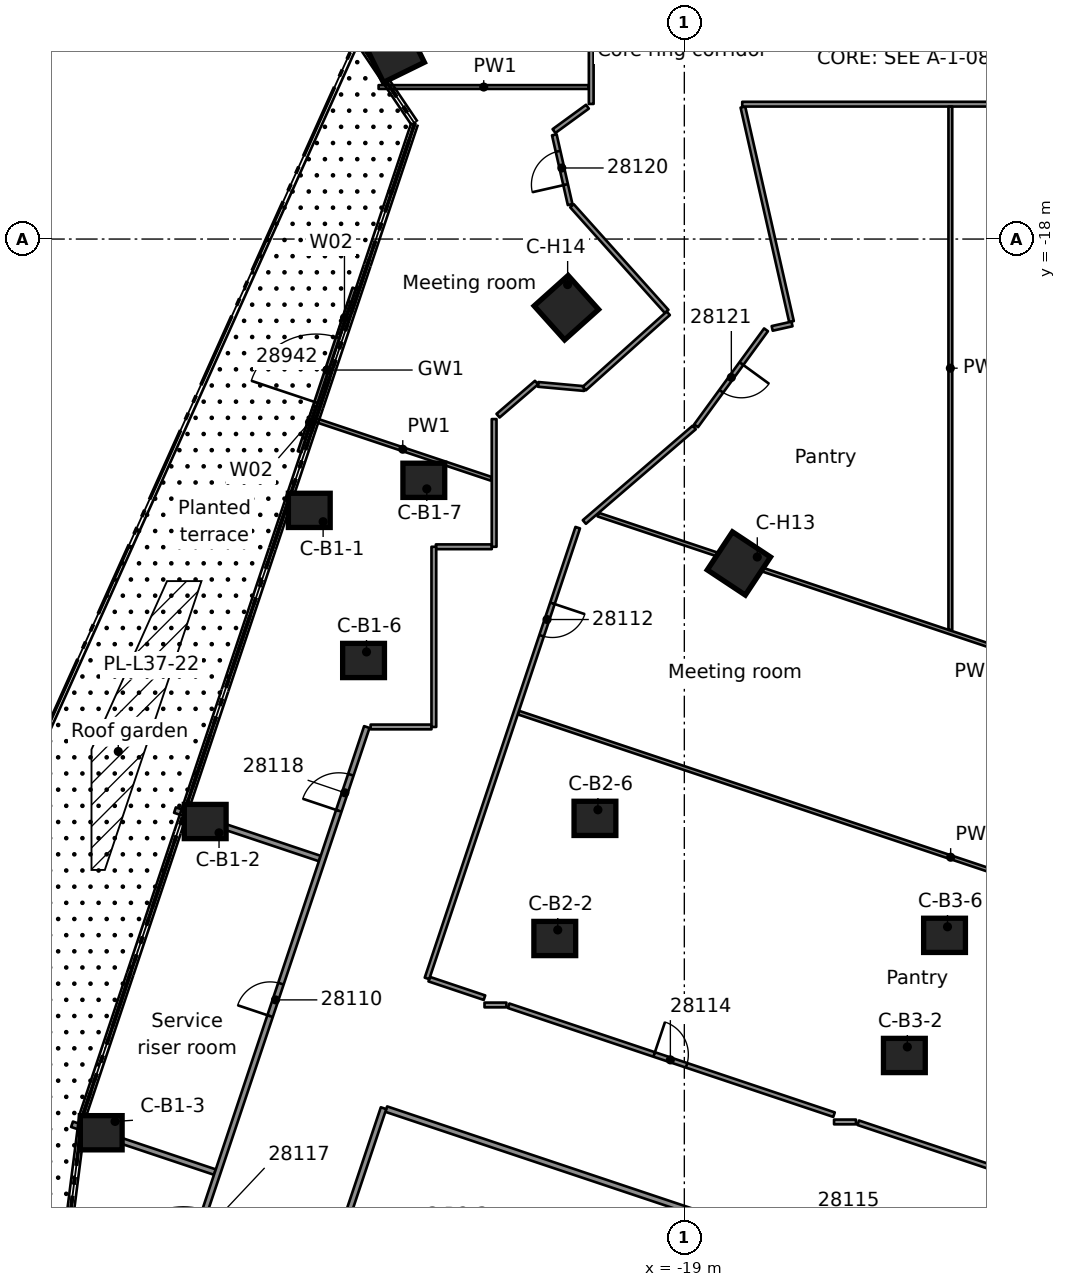
"""IFC4 building model, lengths in metres.
Left out: names, types, materials, properties, quantities, classifications, styles, units other than length and angle.
Written with IfcOpenShell. Run it as: python <this file> out.ifc"""

import sys

from ifc_helpers import new_model, si_unit, direction, frame, frame_2d, origin, origin_2d, place, context, subcontext, project, spatial, rectangle, extrude, element, fill, save


model = new_model("IFC4")
c1 = context("Model", 3, precision=1e-05, world=origin(), true_north=direction((0.0, 1.0)))
c2 = subcontext(c1, "Body", "Model", "MODEL_VIEW")
j1 = project(units=[si_unit("LENGTHUNIT", "METRE"), si_unit("PLANEANGLEUNIT", "RADIAN")], contexts=[c1])
p1 = place(None, origin())
s1 = spatial("IfcSite", under=j1, at=p1, CompositionType="ELEMENT")
p2 = place(p1, origin())
s2 = spatial("IfcBuilding", under=s1, at=p2, CompositionType="ELEMENT")
p3 = place(p2, frame((0.0, 0.0, 145.6)))
s3 = spatial("IfcBuildingStorey", under=s2, at=p3, CompositionType="ELEMENT", Elevation=145.6)
for number, where, z_axis, x_axis in (
    (1, (-28.869, -25.139, 0.0), (0.0, 0.0, 1.0), (1.0, 0.0, 0.0)),
    (2, (-31.608, -33.326, 0.0), (0.0, 0.0, 1.0), (1.0, 0.0, 0.0)),
    (3, (-34.344, -41.515, 0.0), (0.0, 0.0, 1.0), (1.0, 0.0, 0.0)),
    (4, (-27.441, -29.089, 0.0), (0.0, 0.0, 1.0), (1.0, 0.0, 0.0)),
    (5, (-25.855, -24.348, 0.0), (0.0, 0.0, 1.0), (1.0, 0.0, 0.0)),
    (6, (-22.409, -36.404, 0.0), (0.0, 0.0, 1.0), (1.0, 0.0, 0.0)),
    (7, (-21.352, -33.243, 0.0), (0.0, 0.0, 1.0), (1.0, 0.0, 0.0)),
    (8, (-13.21, -39.482, 0.0), (0.0, 0.0, 1.0), (1.0, 0.0, 0.0)),
    (9, (-12.153, -36.321, 0.0), (0.0, 0.0, 1.0), (1.0, 0.0, 0.0)),
):
    element("IfcColumn", number, at=place(p3, frame(where, z_axis=z_axis, x_axis=x_axis)), inside=s3, PredefinedType="COLUMN", context=c2, shape_type="SweptSolid", body=[
        extrude(rectangle(XDim=1.1, YDim=0.9, at=origin_2d()), origin(), (0.0, 0.0, 1.0), 3.5),
    ])
for number, where, z_axis, x_axis in (
    (10, (-17.564, -26.536, 0.0), (0.0, 0.0, 1.0), (-0.552, -0.834, 0.0)),
    (11, (-22.104, -19.806, 0.0), (0.0, 0.0, 1.0), (-0.745, -0.667, 0.0)),
    (12, (-26.644, -13.075, 0.0), (0.0, 0.0, 1.0), (-0.898, -0.441, 0.0)),
):
    element("IfcColumn", number, at=place(p3, frame(where, z_axis=z_axis, x_axis=x_axis)), inside=s3, PredefinedType="COLUMN", context=c2, shape_type="SweptSolid", body=[
        extrude(rectangle(XDim=1.2, YDim=1.2, at=origin_2d()), origin(), (0.0, 0.0, 1.0), 3.5),
    ])
p4 = place(p3, frame((-29.123, -23.598, 0.0), z_axis=(0.0, 0.0, 1.0), x_axis=(0.317308744881, 0.948322287211, 0.0)))
e13 = element("IfcWall", 13, at=p4, inside=s3, PredefinedType="STANDARD", context=c2, shape_type="SweptSolid", body=[
    extrude(rectangle(XDim=4.539, YDim=0.1, at=frame_2d((2.27, 0.0))), origin(), (0.0, 0.0, 1.0), 3.1),
])
p5 = place(p4, frame((1.369, 0.0, 0.0)))
e14 = element("IfcOpeningElement", 14, at=p5, cuts=e13, PredefinedType="OPENING", context=c2, shape_type="SweptSolid", body=[
    extrude(rectangle(XDim=1.8, YDim=2.4, at=frame_2d((0.9, 1.2))), frame((0.0, 0.06, 0.0), z_axis=(0.0, -1.0, 0.0), x_axis=(1.0, 0.0, 0.0)), (0.0, 0.0, 1.0), 0.12),
])
p6 = place(p4, frame((0.369, 0.0, 0.0)))
e15 = element("IfcOpeningElement", 15, at=p6, cuts=e13, PredefinedType="OPENING", context=c2, shape_type="SweptSolid", body=[
    extrude(rectangle(XDim=0.9, YDim=2.4, at=frame_2d((0.45, 1.2))), frame((0.0, 0.06, 0.0), z_axis=(0.0, -1.0, 0.0), x_axis=(1.0, 0.0, 0.0)), (0.0, 0.0, 1.0), 0.12),
])
p7 = place(p4, frame((3.269, 0.0, 0.0)))
e16 = element("IfcOpeningElement", 16, at=p7, cuts=e13, PredefinedType="OPENING", context=c2, shape_type="SweptSolid", body=[
    extrude(rectangle(XDim=0.9, YDim=2.4, at=frame_2d((0.45, 1.2))), frame((0.0, 0.06, 0.0), z_axis=(0.0, -1.0, 0.0), x_axis=(1.0, 0.0, 0.0)), (0.0, 0.0, 1.0), 0.12),
])
p8 = place(p3, frame((-22.005, -17.093, 0.0), z_axis=(0.0, 0.0, 1.0), x_axis=(-0.220993241738, 0.975275339125, 0.0)))
e17 = element("IfcWall", 17, at=p8, inside=s3, PredefinedType="PARTITIONING", context=c2, shape_type="SweptSolid", body=[
    extrude(rectangle(XDim=1.883, YDim=0.125, at=frame_2d((0.941, 0.0))), origin(), (0.0, 0.0, 1.0), 3.08),
])
p9 = place(p8, frame((0.538, 0.0, 0.0)))
e18 = element("IfcOpeningElement", 18, at=p9, cuts=e17, PredefinedType="OPENING", context=c2, shape_type="SweptSolid", body=[
    extrude(rectangle(XDim=0.9, YDim=2.1, at=frame_2d((0.45, 1.05))), frame((0.0, 0.073, 0.0), z_axis=(0.0, -1.0, 0.0), x_axis=(1.0, 0.0, 0.0)), (0.0, 0.0, 1.0), 0.145),
])
p10 = place(p3, frame((-17.459, -14.527, 0.0), z_axis=(0.0, 0.0, 1.0), x_axis=(0.22097932786, -0.975278491847, 0.0)))
e19 = element("IfcWall", 19, at=p10, inside=s3, PredefinedType="PARTITIONING", context=c2, shape_type="SweptSolid", body=[
    extrude(rectangle(XDim=5.788, YDim=0.125, at=frame_2d((2.894, 0.0))), origin(), (0.0, 0.0, 1.0), 3.08),
])
p11 = place(p3, frame((-22.847, -21.824, 0.0), z_axis=(0.0, 0.0, 1.0), x_axis=(0.995911246845, -0.090337082125, 0.0)))
e20 = element("IfcWall", 20, at=p11, inside=s3, PredefinedType="PARTITIONING", context=c2, shape_type="SweptSolid", body=[
    extrude(rectangle(XDim=1.219, YDim=0.125, at=frame_2d((0.609, 0.0))), origin(), (0.0, 0.0, 1.0), 3.08),
])
p12 = place(p3, frame((-21.957, -17.124, 0.0), z_axis=(0.0, 0.0, 1.0), x_axis=(0.667356334738, -0.744738559822, 0.0)))
e21 = element("IfcWall", 21, at=p12, inside=s3, PredefinedType="PARTITIONING", context=c2, shape_type="SweptSolid", body=[
    extrude(rectangle(XDim=3.736, YDim=0.125, at=frame_2d((1.868, 0.0))), origin(), (0.0, 0.0, 1.0), 3.08),
])
p13 = place(p3, frame((-35.112, -41.292, 0.0), z_axis=(0.0, 0.0, 1.0), x_axis=(0.948300748581, -0.317373108881, 0.0)))
e22 = element("IfcWall", 22, at=p13, inside=s3, PredefinedType="PARTITIONING", context=c2, shape_type="SweptSolid", body=[
    extrude(rectangle(XDim=3.964, YDim=0.15, at=frame_2d((1.982, 0.0))), origin(), (0.0, 0.0, 1.0), 3.08),
])
p14 = place(p3, frame((-4.12, -48.496, 0.0), z_axis=(0.0, 0.0, 1.0), x_axis=(-0.948327115108, 0.31729431566, 0.0)))
e23 = element("IfcWall", 23, at=p14, inside=s3, PredefinedType="PARTITIONING", context=c2, shape_type="SweptSolid", body=[
    extrude(rectangle(XDim=23.962, YDim=0.15, at=frame_2d((11.981, 0.0))), origin(), (0.0, 0.0, 1.0), 3.08),
])
p15 = place(p14, frame((11.525, 0.0, 0.0)))
e24 = element("IfcOpeningElement", 24, at=p15, cuts=e23, PredefinedType="OPENING", context=c2, shape_type="SweptSolid", body=[
    extrude(rectangle(XDim=0.9, YDim=2.1, at=frame_2d((0.45, 1.05))), frame((0.0, 0.085, 0.0), z_axis=(0.0, -1.0, 0.0), x_axis=(1.0, 0.0, 0.0)), (0.0, 0.0, 1.0), 0.17),
])
p16 = place(p3, frame((-25.713, -37.474, 0.0), z_axis=(0.0, 0.0, 1.0), x_axis=(0.948252483091, -0.317517288209, 0.0)))
e25 = element("IfcWall", 25, at=p16, inside=s3, PredefinedType="PARTITIONING", context=c2, shape_type="SweptSolid", body=[
    extrude(rectangle(XDim=1.533, YDim=0.125, at=frame_2d((0.767, 0.0))), origin(), (0.0, 0.0, 1.0), 3.08),
])
p17 = place(p3, frame((-23.623, -38.174, 0.0), z_axis=(0.0, 0.0, 1.0), x_axis=(0.948317616384, -0.317322703971, 0.0)))
e26 = element("IfcWall", 26, at=p17, inside=s3, PredefinedType="PARTITIONING", context=c2, shape_type="SweptSolid", body=[
    extrude(rectangle(XDim=9.029, YDim=0.125, at=frame_2d((4.514, 0.0))), origin(), (0.0, 0.0, 1.0), 3.08),
])
p18 = place(p17, frame((4.038, 0.0, 0.0)))
e27 = element("IfcOpeningElement", 27, at=p18, cuts=e26, PredefinedType="OPENING", context=c2, shape_type="SweptSolid", body=[
    extrude(rectangle(XDim=0.9, YDim=2.1, at=frame_2d((0.45, 1.05))), frame((0.0, 0.073, 0.0), z_axis=(0.0, -1.0, 0.0), x_axis=(1.0, 0.0, 0.0)), (0.0, 0.0, 1.0), 0.145),
])
p19 = place(p3, frame((-14.424, -41.252, 0.0), z_axis=(0.0, 0.0, 1.0), x_axis=(0.948339274477, -0.317257971508, 0.0)))
e28 = element("IfcWall", 28, at=p19, inside=s3, PredefinedType="PARTITIONING", context=c2, shape_type="SweptSolid", body=[
    extrude(rectangle(XDim=9.027, YDim=0.125, at=frame_2d((4.514, 0.0))), origin(), (0.0, 0.0, 1.0), 3.08),
])
p20 = place(p3, frame((-32.404, -33.025, 0.0), z_axis=(0.0, 0.0, 1.0), x_axis=(0.948324257316, -0.317302856884, 0.0)))
e29 = element("IfcWall", 29, at=p20, inside=s3, PredefinedType="PARTITIONING", context=c2, shape_type="SweptSolid", body=[
    extrude(rectangle(XDim=4.019, YDim=0.15, at=frame_2d((2.009, 0.0))), origin(), (0.0, 0.0, 1.0), 3.08),
])
p21 = place(p3, frame((-23.366, -30.46, 0.0), z_axis=(0.0, 0.0, 1.0), x_axis=(0.948327494049, -0.317293183083, 0.0)))
e30 = element("IfcWall", 30, at=p21, inside=s3, PredefinedType="PARTITIONING", context=c2, shape_type="SweptSolid", body=[
    extrude(rectangle(XDim=23.988, YDim=0.1, at=frame_2d((11.994, 0.0))), origin(), (0.0, 0.0, 1.0), 3.08),
])
p22 = place(p3, frame((-28.735, -22.752, 0.0), z_axis=(0.0, 0.0, 1.0), x_axis=(0.948349317967, -0.317227948188, 0.0)))
e31 = element("IfcWall", 31, at=p22, inside=s3, PredefinedType="PARTITIONING", context=c2, shape_type="SweptSolid", body=[
    extrude(rectangle(XDim=4.906, YDim=0.1, at=frame_2d((2.453, 0.0))), origin(), (0.0, 0.0, 1.0), 3.08),
])
p23 = place(p3, frame((-21.269, -25.25, 0.0), z_axis=(0.0, 0.0, 1.0), x_axis=(0.948309286751, -0.31734759596, 0.0)))
e32 = element("IfcWall", 32, at=p23, inside=s3, PredefinedType="PARTITIONING", context=c2, shape_type="SweptSolid", body=[
    extrude(rectangle(XDim=22.429, YDim=0.1, at=frame_2d((11.215, 0.0))), origin(), (0.0, 0.0, 1.0), 3.08),
])
for number, where, z_axis, x_axis in (
    (33, (-15.06, -41.231, 0.0), (0.0, 0.0, 1.0), (1.0, 0.0, 0.0)),
    (34, (-24.258, -38.153, 0.0), (0.0, 0.0, 1.0), (1.0, 0.0, 0.0)),
):
    element("IfcWall", number, at=place(p3, frame(where, z_axis=z_axis, x_axis=x_axis)), inside=s3, PredefinedType="PARTITIONING", context=c2, shape_type="SweptSolid", body=[
        extrude(rectangle(XDim=0.576, YDim=0.125, at=frame_2d((0.288, 0.0))), origin(), (0.0, 0.0, 1.0), 3.08),
    ])
p24 = place(p3, frame((-27.255, -30.838, 0.0), z_axis=(0.0, 0.0, 1.0), x_axis=(1.0, 0.0, 0.0)))
e35 = element("IfcWall", 35, at=p24, inside=s3, PredefinedType="PARTITIONING", context=c2, shape_type="SweptSolid", body=[
    extrude(rectangle(XDim=1.601, YDim=0.125, at=frame_2d((0.8, 0.0))), origin(), (0.0, 0.0, 1.0), 3.08),
])
p25 = place(p3, frame((-25.538, -26.097, 0.0), z_axis=(0.0, 0.0, 1.0), x_axis=(1.0, 0.0, 0.0)))
e36 = element("IfcWall", 36, at=p25, inside=s3, PredefinedType="PARTITIONING", context=c2, shape_type="SweptSolid", body=[
    extrude(rectangle(XDim=1.471, YDim=0.125, at=frame_2d((0.736, 0.0))), origin(), (0.0, 0.0, 1.0), 3.08),
])
p26 = place(p3, frame((-17.476, -14.451, 0.0), z_axis=(0.0, 0.0, 1.0), x_axis=(1.0, 0.0, 0.0)))
e37 = element("IfcWall", 37, at=p26, inside=s3, PredefinedType="PARTITIONING", context=c2, shape_type="SweptSolid", body=[
    extrude(rectangle(XDim=7.085, YDim=0.125, at=frame_2d((3.542, 0.0))), origin(), (0.0, 0.0, 1.0), 3.08),
])
p27 = place(p3, frame((-27.045, -14.0, 0.0), z_axis=(0.0, 0.0, 1.0), x_axis=(1.0, 0.0, 0.0)))
e38 = element("IfcWall", 38, at=p27, inside=s3, PredefinedType="PARTITIONING", context=c2, shape_type="SweptSolid", body=[
    extrude(rectangle(XDim=5.533, YDim=0.1, at=frame_2d((2.767, 0.0))), origin(), (0.0, 0.0, 1.0), 3.08),
])
p28 = place(p3, frame((-16.688, -20.351, 0.0), z_axis=(0.0, 0.0, 1.0), x_axis=(0.975624440279, 0.2194469219, 0.0)))
e39 = element("IfcWall", 39, at=p28, inside=s3, PredefinedType="PARTITIONING", context=c2, shape_type="SweptSolid", body=[
    extrude(rectangle(XDim=0.534, YDim=0.125, at=frame_2d((0.267, 0.0))), origin(), (0.0, 0.0, 1.0), 3.08),
])
p29 = place(p3, frame((-22.43, -15.159, 0.0), z_axis=(0.0, 0.0, 1.0), x_axis=(0.808202988532, 0.588904006888, 0.0)))
e40 = element("IfcWall", 40, at=p29, inside=s3, PredefinedType="PARTITIONING", context=c2, shape_type="SweptSolid", body=[
    extrude(rectangle(XDim=1.09, YDim=0.125, at=frame_2d((0.545, 0.0))), origin(), (0.0, 0.0, 1.0), 3.08),
])
p30 = place(p3, frame((-21.631, -25.445, 0.0), z_axis=(0.0, 0.0, 1.0), x_axis=(0.758076355729, 0.652165806283, 0.0)))
e41 = element("IfcWall", 41, at=p30, inside=s3, PredefinedType="PARTITIONING", context=c2, shape_type="SweptSolid", body=[
    extrude(rectangle(XDim=3.815, YDim=0.125, at=frame_2d((1.907, 0.0))), origin(), (0.0, 0.0, 1.0), 3.08),
])
p31 = place(p3, frame((-23.902, -22.648, 0.0), z_axis=(0.0, 0.0, 1.0), x_axis=(0.758365847052, 0.651829150948, 0.0)))
e42 = element("IfcWall", 42, at=p31, inside=s3, PredefinedType="PARTITIONING", context=c2, shape_type="SweptSolid", body=[
    extrude(rectangle(XDim=1.336, YDim=0.125, at=frame_2d((0.668, 0.0))), origin(), (0.0, 0.0, 1.0), 3.08),
])
p32 = place(p3, frame((-21.633, -21.934, 0.0), z_axis=(0.0, 0.0, 1.0), x_axis=(0.744739962286, 0.66735476965, 0.0)))
e43 = element("IfcWall", 43, at=p32, inside=s3, PredefinedType="PARTITIONING", context=c2, shape_type="SweptSolid", body=[
    extrude(rectangle(XDim=2.969, YDim=0.125, at=frame_2d((1.484, 0.0))), origin(), (0.0, 0.0, 1.0), 3.08),
])
p33 = place(p3, frame((-16.85, -20.388, 0.0), z_axis=(0.0, 0.0, 1.0), x_axis=(-0.588933093797, -0.808181793305, 0.0)))
e44 = element("IfcWall", 44, at=p33, inside=s3, PredefinedType="PARTITIONING", context=c2, shape_type="SweptSolid", body=[
    extrude(rectangle(XDim=3.126, YDim=0.125, at=frame_2d((1.563, 0.0))), origin(), (0.0, 0.0, 1.0), 3.08),
])
p34 = place(p33, frame((1.1, 0.0, 0.0)))
e45 = element("IfcOpeningElement", 45, at=p34, cuts=e44, PredefinedType="OPENING", context=c2, shape_type="SweptSolid", body=[
    extrude(rectangle(XDim=0.9, YDim=2.1, at=frame_2d((0.45, 1.05))), frame((0.0, 0.073, 0.0), z_axis=(0.0, -1.0, 0.0), x_axis=(1.0, 0.0, 0.0)), (0.0, 0.0, 1.0), 0.145),
])
p35 = place(p3, frame((-27.868, -43.717, 0.0), z_axis=(0.0, 0.0, 1.0), x_axis=(0.317276218283, 0.948333169995, 0.0)))
e46 = element("IfcWall", 46, at=p35, inside=s3, PredefinedType="PARTITIONING", context=c2, shape_type="SweptSolid", body=[
    extrude(rectangle(XDim=3.003, YDim=0.15, at=frame_2d((1.502, 0.0))), origin(), (0.0, 0.0, 1.0), 3.08),
])
p36 = place(p3, frame((-21.805, -25.594, 0.0), z_axis=(0.0, 0.0, 1.0), x_axis=(-0.317211500161, -0.948354819762, 0.0)))
e47 = element("IfcWall", 47, at=p36, inside=s3, PredefinedType="PARTITIONING", context=c2, shape_type="SweptSolid", body=[
    extrude(rectangle(XDim=12.506, YDim=0.125, at=frame_2d((6.253, 0.0))), origin(), (0.0, 0.0, 1.0), 3.08),
])
p37 = place(p36, frame((2.098, 0.0, 0.0)))
e48 = element("IfcOpeningElement", 48, at=p37, cuts=e47, PredefinedType="OPENING", context=c2, shape_type="SweptSolid", body=[
    extrude(rectangle(XDim=0.9, YDim=2.1, at=frame_2d((0.45, 1.05))), frame((0.0, 0.073, 0.0), z_axis=(0.0, -1.0, 0.0), x_axis=(1.0, 0.0, 0.0)), (0.0, 0.0, 1.0), 0.145),
])
p38 = place(p3, frame((-32.531, -46.306, 0.0), z_axis=(0.0, 0.0, 1.0), x_axis=(0.317372718061, 0.948300879379, 0.0)))
e49 = element("IfcWall", 49, at=p38, inside=s3, PredefinedType="PARTITIONING", context=c2, shape_type="SweptSolid", body=[
    extrude(rectangle(XDim=16.309, YDim=0.15, at=frame_2d((8.155, 0.0))), origin(), (0.0, 0.0, 1.0), 3.08),
])
p39 = place(p38, frame((8.289, 0.0, 0.0)))
e50 = element("IfcOpeningElement", 50, at=p39, cuts=e49, PredefinedType="OPENING", context=c2, shape_type="SweptSolid", body=[
    extrude(rectangle(XDim=0.9, YDim=2.1, at=frame_2d((0.45, 1.05))), frame((0.0, 0.085, 0.0), z_axis=(0.0, -1.0, 0.0), x_axis=(1.0, 0.0, 0.0)), (0.0, 0.0, 1.0), 0.17),
])
p40 = place(p38, frame((1.1, 0.0, 0.0)))
e51 = element("IfcOpeningElement", 51, at=p40, cuts=e49, PredefinedType="OPENING", context=c2, shape_type="SweptSolid", body=[
    extrude(rectangle(XDim=1.8, YDim=2.1, at=frame_2d((0.9, 1.05))), frame((0.0, 0.085, 0.0), z_axis=(0.0, -1.0, 0.0), x_axis=(1.0, 0.0, 0.0)), (0.0, 0.0, 1.0), 0.17),
])
p41 = place(p38, frame((13.985, 0.0, 0.0)))
e52 = element("IfcOpeningElement", 52, at=p41, cuts=e49, PredefinedType="OPENING", context=c2, shape_type="SweptSolid", body=[
    extrude(rectangle(XDim=1.0, YDim=2.1, at=frame_2d((0.5, 1.05))), frame((0.0, 0.085, 0.0), z_axis=(0.0, -1.0, 0.0), x_axis=(1.0, 0.0, 0.0)), (0.0, 0.0, 1.0), 0.17),
])
p42 = place(p3, frame((-12.0, -28.282, 0.0), z_axis=(0.0, 0.0, 1.0), x_axis=(0.0, 1.0, 0.0)))
e53 = element("IfcWall", 53, at=p42, inside=s3, PredefinedType="PARTITIONING", context=c2, shape_type="SweptSolid", body=[
    extrude(rectangle(XDim=13.768, YDim=0.1, at=frame_2d((6.884, 0.0))), origin(), (0.0, 0.0, 1.0), 3.08),
])
p43 = place(p3, frame((-21.45, -14.445, 0.0), z_axis=(0.0, 0.0, 1.0), x_axis=(0.0, 1.0, 0.0)))
e54 = element("IfcWall", 54, at=p43, inside=s3, PredefinedType="PARTITIONING", context=c2, shape_type="SweptSolid", body=[
    extrude(rectangle(XDim=28.896, YDim=0.125, at=frame_2d((14.448, 0.0))), origin(), (0.0, 0.0, 1.0), 3.08),
])
p44 = place(p43, frame((7.045, 0.0, 0.0)))
e55 = element("IfcOpeningElement", 55, at=p44, cuts=e54, PredefinedType="OPENING", context=c2, shape_type="SweptSolid", body=[
    extrude(rectangle(XDim=0.9, YDim=2.1, at=frame_2d((0.45, 1.05))), frame((0.0, 0.073, 0.0), z_axis=(0.0, -1.0, 0.0), x_axis=(1.0, 0.0, 0.0)), (0.0, 0.0, 1.0), 0.145),
])
p45 = place(p43, frame((17.769, 0.0, 0.0)))
e56 = element("IfcOpeningElement", 56, at=p45, cuts=e54, PredefinedType="OPENING", context=c2, shape_type="SweptSolid", body=[
    extrude(rectangle(XDim=1.0, YDim=2.1, at=frame_2d((0.5, 1.05))), frame((0.0, 0.073, 0.0), z_axis=(0.0, -1.0, 0.0), x_axis=(1.0, 0.0, 0.0)), (0.0, 0.0, 1.0), 0.145),
])
p46 = place(p3, frame((-24.005, -26.097, 0.0), z_axis=(0.0, 0.0, 1.0), x_axis=(0.0, 1.0, 0.0)))
e57 = element("IfcWall", 57, at=p46, inside=s3, PredefinedType="PARTITIONING", context=c2, shape_type="SweptSolid", body=[
    extrude(rectangle(XDim=3.36, YDim=0.125, at=frame_2d((1.68, 0.0))), origin(), (0.0, 0.0, 1.0), 3.08),
])
p47 = place(p3, frame((-25.591, -30.838, 0.0), z_axis=(0.0, 0.0, 1.0), x_axis=(0.0, 1.0, 0.0)))
e58 = element("IfcWall", 58, at=p47, inside=s3, PredefinedType="PARTITIONING", context=c2, shape_type="SweptSolid", body=[
    extrude(rectangle(XDim=4.741, YDim=0.125, at=frame_2d((2.371, 0.0))), origin(), (0.0, 0.0, 1.0), 3.08),
])
p48 = place(p5, origin())
e59 = element("IfcDoor", 59, at=p48, inside=s3, OperationType="DOUBLE_DOOR_SINGLE_SWING", PredefinedType="DOOR", context=c2, shape_type="SweptSolid", body=[
    extrude(rectangle(XDim=1.8, YDim=2.4, at=frame_2d((0.9, 1.2))), frame((0.0, 0.025, 0.0), z_axis=(0.0, -1.0, 0.0), x_axis=(1.0, 0.0, 0.0)), (0.0, 0.0, 1.0), 0.05),
])
fill(e14, e59)
p49 = place(p6, origin())
e60 = element("IfcWindow", 60, at=p49, inside=s3, PartitioningType="SINGLE_PANEL", PredefinedType="WINDOW", context=c2, shape_type="SweptSolid", body=[
    extrude(rectangle(XDim=0.9, YDim=2.4, at=frame_2d((0.45, 1.2))), frame((0.0, 0.03, 0.0), z_axis=(0.0, -1.0, 0.0), x_axis=(1.0, 0.0, 0.0)), (0.0, 0.0, 1.0), 0.06),
])
fill(e15, e60)
p50 = place(p7, origin())
e61 = element("IfcWindow", 61, at=p50, inside=s3, PartitioningType="SINGLE_PANEL", PredefinedType="WINDOW", context=c2, shape_type="SweptSolid", body=[
    extrude(rectangle(XDim=0.9, YDim=2.4, at=frame_2d((0.45, 1.2))), frame((0.0, 0.03, 0.0), z_axis=(0.0, -1.0, 0.0), x_axis=(1.0, 0.0, 0.0)), (0.0, 0.0, 1.0), 0.06),
])
fill(e16, e61)
p51 = place(p39, origin())
e62 = element("IfcDoor", 62, at=p51, inside=s3, OperationType="SINGLE_SWING_RIGHT", PredefinedType="DOOR", context=c2, shape_type="SweptSolid", body=[
    extrude(rectangle(XDim=0.9, YDim=2.1, at=frame_2d((0.45, 1.05))), frame((0.0, 0.025, 0.0), z_axis=(0.0, -1.0, 0.0), x_axis=(1.0, 0.0, 0.0)), (0.0, 0.0, 1.0), 0.05),
])
fill(e50, e62)
p52 = place(p37, origin())
e63 = element("IfcDoor", 63, at=p52, inside=s3, OperationType="SINGLE_SWING_LEFT", PredefinedType="DOOR", context=c2, shape_type="SweptSolid", body=[
    extrude(rectangle(XDim=0.9, YDim=2.1, at=frame_2d((0.45, 1.05))), frame((0.0, 0.025, 0.0), z_axis=(0.0, -1.0, 0.0), x_axis=(1.0, 0.0, 0.0)), (0.0, 0.0, 1.0), 0.05),
])
fill(e48, e63)
p53 = place(p18, origin())
e64 = element("IfcDoor", 64, at=p53, inside=s3, OperationType="SINGLE_SWING_LEFT", PredefinedType="DOOR", context=c2, shape_type="SweptSolid", body=[
    extrude(rectangle(XDim=0.9, YDim=2.1, at=frame_2d((0.45, 1.05))), frame((0.0, 0.025, 0.0), z_axis=(0.0, -1.0, 0.0), x_axis=(1.0, 0.0, 0.0)), (0.0, 0.0, 1.0), 0.05),
])
fill(e27, e64)
p54 = place(p41, origin())
e65 = element("IfcDoor", 65, at=p54, inside=s3, OperationType="SINGLE_SWING_RIGHT", PredefinedType="DOOR", context=c2, shape_type="SweptSolid", body=[
    extrude(rectangle(XDim=1.0, YDim=2.1, at=frame_2d((0.5, 1.05))), frame((0.0, 0.025, 0.0), z_axis=(0.0, -1.0, 0.0), x_axis=(1.0, 0.0, 0.0)), (0.0, 0.0, 1.0), 0.05),
])
fill(e52, e65)
p55 = place(p9, origin())
e66 = element("IfcDoor", 66, at=p55, inside=s3, OperationType="SINGLE_SWING_RIGHT", PredefinedType="DOOR", context=c2, shape_type="SweptSolid", body=[
    extrude(rectangle(XDim=0.9, YDim=2.1, at=frame_2d((0.45, 1.05))), frame((0.0, 0.025, 0.0), z_axis=(0.0, -1.0, 0.0), x_axis=(1.0, 0.0, 0.0)), (0.0, 0.0, 1.0), 0.05),
])
fill(e18, e66)
p56 = place(p34, origin())
e67 = element("IfcDoor", 67, at=p56, inside=s3, OperationType="SINGLE_SWING_LEFT", PredefinedType="DOOR", context=c2, shape_type="SweptSolid", body=[
    extrude(rectangle(XDim=0.9, YDim=2.1, at=frame_2d((0.45, 1.05))), frame((0.0, 0.025, 0.0), z_axis=(0.0, -1.0, 0.0), x_axis=(1.0, 0.0, 0.0)), (0.0, 0.0, 1.0), 0.05),
])
fill(e45, e67)
save(model, sys.argv[1])
